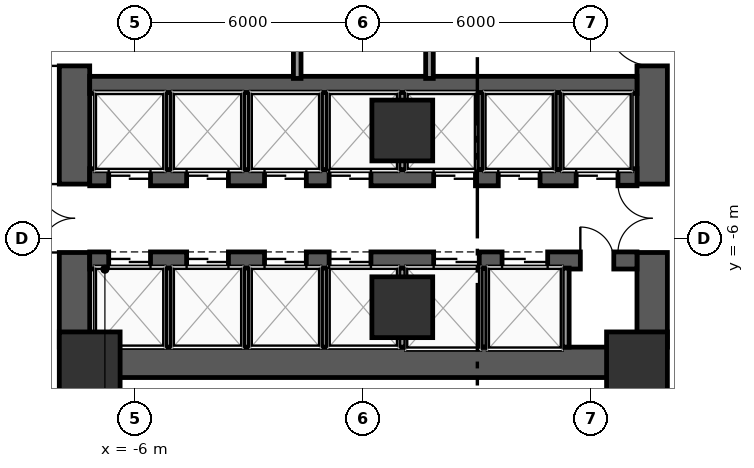
"""IFC4 building model, lengths in metres.
Left out: names, types, materials, properties, quantities, classifications, styles, units other than length and angle.
Written with IfcOpenShell. Run it as: python <this file> out.ifc"""

import sys

from ifc_helpers import new_model, si_unit, direction, frame, frame_2d, origin, origin_2d, place, context, subcontext, project, spatial, rectangle, extrude, element, fill, save


model = new_model("IFC4")
c1 = context("Model", 3, precision=1e-05, world=origin(), true_north=direction((0.0, 1.0)))
c2 = subcontext(c1, "Body", "Model", "MODEL_VIEW")
j1 = project(units=[si_unit("LENGTHUNIT", "METRE"), si_unit("PLANEANGLEUNIT", "RADIAN")], contexts=[c1])
p1 = place(None, origin())
s1 = spatial("IfcSite", under=j1, at=p1, CompositionType="ELEMENT")
p2 = place(p1, origin())
s2 = spatial("IfcBuilding", under=s1, at=p2, CompositionType="ELEMENT")
p3 = place(p2, origin())
s3 = spatial("IfcBuildingStorey", under=s2, at=p3, CompositionType="ELEMENT", Elevation=0.0)
p4 = place(p3, frame((-7.6, -8.85, 0.0), z_axis=(0.0, 0.0, 1.0), x_axis=(0.0, 1.0, 0.0)))
e1 = element("IfcWall", 1, at=p4, inside=s3, PredefinedType="SHEAR", context=c2, shape_type="SweptSolid", body=[
    extrude(rectangle(XDim=8.95, YDim=0.8, at=frame_2d((4.475, 0.0))), origin(), (0.0, 0.0, 1.0), 5.7),
])
p5 = place(p4, frame((2.49, 0.0, 0.0)))
e2 = element("IfcOpeningElement", 2, at=p5, cuts=e1, PredefinedType="OPENING", context=c2, shape_type="SweptSolid", body=[
    extrude(rectangle(XDim=1.8, YDim=2.2, at=frame_2d((0.9, 1.1))), frame((0.0, 0.41, 0.0), z_axis=(0.0, -1.0, 0.0), x_axis=(1.0, 0.0, 0.0)), (0.0, 0.0, 1.0), 0.82),
])
p6 = place(p4, frame((7.4, 0.0, 0.0)))
e3 = element("IfcOpeningElement", 3, at=p6, cuts=e1, PredefinedType="OPENING", context=c2, shape_type="SweptSolid", body=[
    extrude(rectangle(XDim=1.2, YDim=2.15, at=frame_2d((0.6, 1.075))), frame((0.0, 0.41, 0.0), z_axis=(0.0, -1.0, 0.0), x_axis=(1.0, 0.0, 0.0)), (0.0, 0.0, 1.0), 0.82),
])
p7 = place(p3, frame((7.6, -8.85, 0.0), z_axis=(0.0, 0.0, 1.0), x_axis=(0.0, 1.0, 0.0)))
e4 = element("IfcWall", 4, at=p7, inside=s3, PredefinedType="SHEAR", context=c2, shape_type="SweptSolid", body=[
    extrude(rectangle(XDim=8.95, YDim=0.8, at=frame_2d((4.475, 0.0))), origin(), (0.0, 0.0, 1.0), 5.7),
])
p8 = place(p7, frame((2.49, 0.0, 0.0)))
e5 = element("IfcOpeningElement", 5, at=p8, cuts=e4, PredefinedType="OPENING", context=c2, shape_type="SweptSolid", body=[
    extrude(rectangle(XDim=1.8, YDim=2.2, at=frame_2d((0.9, 1.1))), frame((0.0, 0.41, 0.0), z_axis=(0.0, -1.0, 0.0), x_axis=(1.0, 0.0, 0.0)), (0.0, 0.0, 1.0), 0.82),
])
p9 = place(p7, frame((7.4, 0.0, 0.0)))
e6 = element("IfcOpeningElement", 6, at=p9, cuts=e4, PredefinedType="OPENING", context=c2, shape_type="SweptSolid", body=[
    extrude(rectangle(XDim=1.2, YDim=2.15, at=frame_2d((0.6, 1.075))), frame((0.0, 0.41, 0.0), z_axis=(0.0, -1.0, 0.0), x_axis=(1.0, 0.0, 0.0)), (0.0, 0.0, 1.0), 0.82),
])
p10 = place(p3, frame((-7.6, -9.25, 0.0), z_axis=(0.0, 0.0, 1.0), x_axis=(1.0, 0.0, 0.0)))
e7 = element("IfcWall", 7, at=p10, inside=s3, PredefinedType="SHEAR", context=c2, shape_type="SweptSolid", body=[
    extrude(rectangle(XDim=15.2, YDim=0.8, at=frame_2d((7.6, 0.0))), origin(), (0.0, 0.0, 1.0), 5.7),
])
p11 = place(p3, frame((-7.2, -1.95, 0.0), z_axis=(0.0, 0.0, 1.0), x_axis=(1.0, 0.0, 0.0)))
e8 = element("IfcWall", 8, at=p11, inside=s3, PredefinedType="SHEAR", context=c2, shape_type="SweptSolid", body=[
    extrude(rectangle(XDim=14.4, YDim=0.45, at=frame_2d((7.2, 0.0))), origin(), (0.0, 0.0, 1.0), 5.7),
])
p12 = place(p3, frame((-7.2, -4.38, 0.0), z_axis=(0.0, 0.0, 1.0), x_axis=(1.0, 0.0, 0.0)))
e9 = element("IfcWall", 9, at=p12, inside=s3, PredefinedType="SHEAR", context=c2, shape_type="SweptSolid", body=[
    extrude(rectangle(XDim=14.4, YDim=0.45, at=frame_2d((7.2, 0.0))), origin(), (0.0, 0.0, 1.0), 5.7),
])
p13 = place(p12, frame((0.5, 0.0, 0.0)))
e10 = element("IfcOpeningElement", 10, at=p13, cuts=e9, PredefinedType="OPENING", context=c2, shape_type="SweptSolid", body=[
    extrude(rectangle(XDim=1.1, YDim=2.2, at=frame_2d((0.55, 1.1))), frame((0.0, 0.235, 0.0), z_axis=(0.0, -1.0, 0.0), x_axis=(1.0, 0.0, 0.0)), (0.0, 0.0, 1.0), 0.47),
])
p14 = place(p12, frame((2.55, 0.0, 0.0)))
e11 = element("IfcOpeningElement", 11, at=p14, cuts=e9, PredefinedType="OPENING", context=c2, shape_type="SweptSolid", body=[
    extrude(rectangle(XDim=1.1, YDim=2.2, at=frame_2d((0.55, 1.1))), frame((0.0, 0.235, 0.0), z_axis=(0.0, -1.0, 0.0), x_axis=(1.0, 0.0, 0.0)), (0.0, 0.0, 1.0), 0.47),
])
p15 = place(p12, frame((4.6, 0.0, 0.0)))
e12 = element("IfcOpeningElement", 12, at=p15, cuts=e9, PredefinedType="OPENING", context=c2, shape_type="SweptSolid", body=[
    extrude(rectangle(XDim=1.1, YDim=2.2, at=frame_2d((0.55, 1.1))), frame((0.0, 0.235, 0.0), z_axis=(0.0, -1.0, 0.0), x_axis=(1.0, 0.0, 0.0)), (0.0, 0.0, 1.0), 0.47),
])
p16 = place(p12, frame((6.3, 0.0, 0.0)))
e13 = element("IfcOpeningElement", 13, at=p16, cuts=e9, PredefinedType="OPENING", context=c2, shape_type="SweptSolid", body=[
    extrude(rectangle(XDim=1.1, YDim=2.2, at=frame_2d((0.55, 1.1))), frame((0.0, 0.235, 0.0), z_axis=(0.0, -1.0, 0.0), x_axis=(1.0, 0.0, 0.0)), (0.0, 0.0, 1.0), 0.47),
])
p17 = place(p12, frame((9.05, 0.0, 0.0)))
e14 = element("IfcOpeningElement", 14, at=p17, cuts=e9, PredefinedType="OPENING", context=c2, shape_type="SweptSolid", body=[
    extrude(rectangle(XDim=1.1, YDim=2.2, at=frame_2d((0.55, 1.1))), frame((0.0, 0.235, 0.0), z_axis=(0.0, -1.0, 0.0), x_axis=(1.0, 0.0, 0.0)), (0.0, 0.0, 1.0), 0.47),
])
p18 = place(p12, frame((10.75, 0.0, 0.0)))
e15 = element("IfcOpeningElement", 15, at=p18, cuts=e9, PredefinedType="OPENING", context=c2, shape_type="SweptSolid", body=[
    extrude(rectangle(XDim=1.1, YDim=2.2, at=frame_2d((0.55, 1.1))), frame((0.0, 0.235, 0.0), z_axis=(0.0, -1.0, 0.0), x_axis=(1.0, 0.0, 0.0)), (0.0, 0.0, 1.0), 0.47),
])
p19 = place(p12, frame((12.8, 0.0, 0.0)))
e16 = element("IfcOpeningElement", 16, at=p19, cuts=e9, PredefinedType="OPENING", context=c2, shape_type="SweptSolid", body=[
    extrude(rectangle(XDim=1.1, YDim=2.2, at=frame_2d((0.55, 1.1))), frame((0.0, 0.235, 0.0), z_axis=(0.0, -1.0, 0.0), x_axis=(1.0, 0.0, 0.0)), (0.0, 0.0, 1.0), 0.47),
])
p20 = place(p3, frame((-7.2, -6.57, 0.0), z_axis=(0.0, 0.0, 1.0), x_axis=(1.0, 0.0, 0.0)))
e17 = element("IfcWall", 17, at=p20, inside=s3, PredefinedType="SHEAR", context=c2, shape_type="SweptSolid", body=[
    extrude(rectangle(XDim=14.4, YDim=0.45, at=frame_2d((7.2, 0.0))), origin(), (0.0, 0.0, 1.0), 5.7),
])
p21 = place(p20, frame((0.5, 0.0, 0.0)))
e18 = element("IfcOpeningElement", 18, at=p21, cuts=e17, PredefinedType="OPENING", context=c2, shape_type="SweptSolid", body=[
    extrude(rectangle(XDim=1.1, YDim=2.2, at=frame_2d((0.55, 1.1))), frame((0.0, 0.235, 0.0), z_axis=(0.0, -1.0, 0.0), x_axis=(1.0, 0.0, 0.0)), (0.0, 0.0, 1.0), 0.47),
])
p22 = place(p20, frame((2.55, 0.0, 0.0)))
e19 = element("IfcOpeningElement", 19, at=p22, cuts=e17, PredefinedType="OPENING", context=c2, shape_type="SweptSolid", body=[
    extrude(rectangle(XDim=1.1, YDim=2.2, at=frame_2d((0.55, 1.1))), frame((0.0, 0.235, 0.0), z_axis=(0.0, -1.0, 0.0), x_axis=(1.0, 0.0, 0.0)), (0.0, 0.0, 1.0), 0.47),
])
p23 = place(p20, frame((4.6, 0.0, 0.0)))
e20 = element("IfcOpeningElement", 20, at=p23, cuts=e17, PredefinedType="OPENING", context=c2, shape_type="SweptSolid", body=[
    extrude(rectangle(XDim=1.1, YDim=2.2, at=frame_2d((0.55, 1.1))), frame((0.0, 0.235, 0.0), z_axis=(0.0, -1.0, 0.0), x_axis=(1.0, 0.0, 0.0)), (0.0, 0.0, 1.0), 0.47),
])
p24 = place(p20, frame((6.3, 0.0, 0.0)))
e21 = element("IfcOpeningElement", 21, at=p24, cuts=e17, PredefinedType="OPENING", context=c2, shape_type="SweptSolid", body=[
    extrude(rectangle(XDim=1.1, YDim=2.2, at=frame_2d((0.55, 1.1))), frame((0.0, 0.235, 0.0), z_axis=(0.0, -1.0, 0.0), x_axis=(1.0, 0.0, 0.0)), (0.0, 0.0, 1.0), 0.47),
])
p25 = place(p20, frame((9.05, 0.0, 0.0)))
e22 = element("IfcOpeningElement", 22, at=p25, cuts=e17, PredefinedType="OPENING", context=c2, shape_type="SweptSolid", body=[
    extrude(rectangle(XDim=1.2, YDim=2.25, at=frame_2d((0.6, 1.125))), frame((0.0, 0.235, 0.0), z_axis=(0.0, -1.0, 0.0), x_axis=(1.0, 0.0, 0.0)), (0.0, 0.0, 1.0), 0.47),
])
p26 = place(p20, frame((10.85, 0.0, 0.0)))
e23 = element("IfcOpeningElement", 23, at=p26, cuts=e17, PredefinedType="OPENING", context=c2, shape_type="SweptSolid", body=[
    extrude(rectangle(XDim=1.2, YDim=2.25, at=frame_2d((0.6, 1.125))), frame((0.0, 0.235, 0.0), z_axis=(0.0, -1.0, 0.0), x_axis=(1.0, 0.0, 0.0)), (0.0, 0.0, 1.0), 0.47),
])
p27 = place(p20, frame((12.91, 0.0, 0.0)))
e24 = element("IfcOpeningElement", 24, at=p27, cuts=e17, PredefinedType="OPENING", context=c2, shape_type="SweptSolid", body=[
    extrude(rectangle(XDim=0.88, YDim=2.15, at=frame_2d((0.44, 1.075))), frame((0.0, 0.235, 0.0), z_axis=(0.0, -1.0, 0.0), x_axis=(1.0, 0.0, 0.0)), (0.0, 0.0, 1.0), 0.47),
])
for number, where, z_axis, x_axis in (
    (25, (-7.2, -9.25, 0.0), (0.0, 0.0, 1.0), (1.0, 0.0, 0.0)),
    (26, (7.2, -9.25, 0.0), (0.0, 0.0, 1.0), (1.0, 0.0, 0.0)),
    (27, (1.025, -3.15, 0.0), (0.0, 0.0, 1.0), (1.0, 0.0, 0.0)),
    (28, (1.025, -7.8, 0.0), (0.0, 0.0, 1.0), (1.0, 0.0, 0.0)),
):
    element("IfcColumn", number, at=place(p3, frame(where, z_axis=z_axis, x_axis=x_axis)), inside=s3, PredefinedType="COLUMN", context=c2, shape_type="SweptSolid", body=[
        extrude(rectangle(XDim=1.6, YDim=1.6, at=origin_2d()), origin(), (0.0, 0.0, 1.0), 6.0),
    ])
for number, where, z_axis, x_axis in (
    (29, (-5.125, -4.18, 0.0), (0.0, 0.0, 1.0), (0.0, 1.0, 0.0)),
    (30, (-3.075, -4.18, 0.0), (0.0, 0.0, 1.0), (0.0, 1.0, 0.0)),
    (31, (-1.025, -4.18, 0.0), (0.0, 0.0, 1.0), (0.0, 1.0, 0.0)),
):
    element("IfcWall", number, at=place(p3, frame(where, z_axis=z_axis, x_axis=x_axis)), inside=s3, PredefinedType="PARTITIONING", context=c2, shape_type="SweptSolid", body=[
        extrude(rectangle(XDim=2.03, YDim=0.15, at=frame_2d((1.015, 0.0))), origin(), (0.0, 0.0, 1.0), 5.7),
    ])
p28 = place(p3, frame((1.025, -4.18, 0.0), z_axis=(0.0, 0.0, 1.0), x_axis=(0.0, 1.0, 0.0)))
e32 = element("IfcWall", 32, at=p28, inside=s3, PredefinedType="PARTITIONING", context=c2, shape_type="SweptSolid", body=[
    extrude(rectangle(XDim=2.03, YDim=0.18, at=frame_2d((1.015, 0.0))), origin(), (0.0, 0.0, 1.0), 4.748),
])
for number, where, z_axis, x_axis in (
    (33, (3.075, -4.18, 0.0), (0.0, 0.0, 1.0), (0.0, 1.0, 0.0)),
    (34, (5.125, -4.18, 0.0), (0.0, 0.0, 1.0), (0.0, 1.0, 0.0)),
):
    element("IfcWall", number, at=place(p3, frame(where, z_axis=z_axis, x_axis=x_axis)), inside=s3, PredefinedType="PARTITIONING", context=c2, shape_type="SweptSolid", body=[
        extrude(rectangle(XDim=2.03, YDim=0.15, at=frame_2d((1.015, 0.0))), origin(), (0.0, 0.0, 1.0), 5.7),
    ])
for number, where, z_axis, x_axis in (
    (35, (-5.125, -8.85, 0.0), (0.0, 0.0, 1.0), (0.0, 1.0, 0.0)),
    (36, (-3.075, -8.85, 0.0), (0.0, 0.0, 1.0), (0.0, 1.0, 0.0)),
    (37, (-1.025, -8.85, 0.0), (0.0, 0.0, 1.0), (0.0, 1.0, 0.0)),
):
    element("IfcWall", number, at=place(p3, frame(where, z_axis=z_axis, x_axis=x_axis)), inside=s3, PredefinedType="PARTITIONING", context=c2, shape_type="SweptSolid", body=[
        extrude(rectangle(XDim=2.08, YDim=0.15, at=frame_2d((1.04, 0.0))), origin(), (0.0, 0.0, 1.0), 5.7),
    ])
p29 = place(p3, frame((1.025, -8.85, 0.0), z_axis=(0.0, 0.0, 1.0), x_axis=(0.0, 1.0, 0.0)))
e38 = element("IfcWall", 38, at=p29, inside=s3, PredefinedType="PARTITIONING", context=c2, shape_type="SweptSolid", body=[
    extrude(rectangle(XDim=2.08, YDim=0.18, at=frame_2d((1.04, 0.0))), origin(), (0.0, 0.0, 1.0), 4.748),
])
p30 = place(p3, frame((3.175, -8.85, 0.0), z_axis=(0.0, 0.0, 1.0), x_axis=(0.0, 1.0, 0.0)))
e39 = element("IfcWall", 39, at=p30, inside=s3, PredefinedType="PARTITIONING", context=c2, shape_type="SweptSolid", body=[
    extrude(rectangle(XDim=2.08, YDim=0.15, at=frame_2d((1.04, 0.0))), origin(), (0.0, 0.0, 1.0), 5.7),
])
p31 = place(p3, frame((5.325, -8.85, 0.0), z_axis=(0.0, 0.0, 1.0), x_axis=(0.0, 1.0, 0.0)))
e40 = element("IfcWall", 40, at=p31, inside=s3, PredefinedType="PARTITIONING", context=c2, shape_type="SweptSolid", body=[
    extrude(rectangle(XDim=2.08, YDim=0.18, at=frame_2d((1.04, 0.0))), origin(), (0.0, 0.0, 1.0), 5.7),
])
p32 = place(p3, frame((-1.74, -1.78, 0.0), z_axis=(0.0, 0.0, 1.0), x_axis=(0.0, 1.0, 0.0)))
e41 = element("IfcWall", 41, at=p32, inside=s3, PredefinedType="PARTITIONING", context=c2, shape_type="SweptSolid", body=[
    extrude(rectangle(XDim=2.98, YDim=0.2, at=frame_2d((1.49, 0.0))), origin(), (0.0, 0.0, 1.0), 5.7),
])
p33 = place(p32, frame((0.89, 0.0, 0.0)))
e42 = element("IfcOpeningElement", 42, at=p33, cuts=e41, PredefinedType="OPENING", context=c2, shape_type="SweptSolid", body=[
    extrude(rectangle(XDim=0.88, YDim=2.15, at=frame_2d((0.44, 1.075))), frame((0.0, 0.11, 0.0), z_axis=(0.0, -1.0, 0.0), x_axis=(1.0, 0.0, 0.0)), (0.0, 0.0, 1.0), 0.22),
])
p34 = place(p3, frame((1.74, -1.78, 0.0), z_axis=(0.0, 0.0, 1.0), x_axis=(0.0, 1.0, 0.0)))
e43 = element("IfcWall", 43, at=p34, inside=s3, PredefinedType="PARTITIONING", context=c2, shape_type="SweptSolid", body=[
    extrude(rectangle(XDim=2.98, YDim=0.2, at=frame_2d((1.49, 0.0))), origin(), (0.0, 0.0, 1.0), 5.7),
])
p35 = place(p13, origin())
e44 = element("IfcDoor", 44, at=p35, inside=s3, OperationType="DOUBLE_DOOR_SLIDING", PredefinedType="DOOR", context=c2, shape_type="SweptSolid", body=[
    extrude(rectangle(XDim=1.1, YDim=2.2, at=frame_2d((0.55, 1.1))), frame((0.0, 0.025, 0.0), z_axis=(0.0, -1.0, 0.0), x_axis=(1.0, 0.0, 0.0)), (0.0, 0.0, 1.0), 0.05),
])
fill(e10, e44)
p36 = place(p14, origin())
e45 = element("IfcDoor", 45, at=p36, inside=s3, OperationType="DOUBLE_DOOR_SLIDING", PredefinedType="DOOR", context=c2, shape_type="SweptSolid", body=[
    extrude(rectangle(XDim=1.1, YDim=2.2, at=frame_2d((0.55, 1.1))), frame((0.0, 0.025, 0.0), z_axis=(0.0, -1.0, 0.0), x_axis=(1.0, 0.0, 0.0)), (0.0, 0.0, 1.0), 0.05),
])
fill(e11, e45)
p37 = place(p15, origin())
e46 = element("IfcDoor", 46, at=p37, inside=s3, OperationType="DOUBLE_DOOR_SLIDING", PredefinedType="DOOR", context=c2, shape_type="SweptSolid", body=[
    extrude(rectangle(XDim=1.1, YDim=2.2, at=frame_2d((0.55, 1.1))), frame((0.0, 0.025, 0.0), z_axis=(0.0, -1.0, 0.0), x_axis=(1.0, 0.0, 0.0)), (0.0, 0.0, 1.0), 0.05),
])
fill(e12, e46)
p38 = place(p16, origin())
e47 = element("IfcDoor", 47, at=p38, inside=s3, OperationType="DOUBLE_DOOR_SLIDING", PredefinedType="DOOR", context=c2, shape_type="SweptSolid", body=[
    extrude(rectangle(XDim=1.1, YDim=2.2, at=frame_2d((0.55, 1.1))), frame((0.0, 0.025, 0.0), z_axis=(0.0, -1.0, 0.0), x_axis=(1.0, 0.0, 0.0)), (0.0, 0.0, 1.0), 0.05),
])
fill(e13, e47)
p39 = place(p17, origin())
e48 = element("IfcDoor", 48, at=p39, inside=s3, OperationType="DOUBLE_DOOR_SLIDING", PredefinedType="DOOR", context=c2, shape_type="SweptSolid", body=[
    extrude(rectangle(XDim=1.1, YDim=2.2, at=frame_2d((0.55, 1.1))), frame((0.0, 0.025, 0.0), z_axis=(0.0, -1.0, 0.0), x_axis=(1.0, 0.0, 0.0)), (0.0, 0.0, 1.0), 0.05),
])
fill(e14, e48)
p40 = place(p18, origin())
e49 = element("IfcDoor", 49, at=p40, inside=s3, OperationType="DOUBLE_DOOR_SLIDING", PredefinedType="DOOR", context=c2, shape_type="SweptSolid", body=[
    extrude(rectangle(XDim=1.1, YDim=2.2, at=frame_2d((0.55, 1.1))), frame((0.0, 0.025, 0.0), z_axis=(0.0, -1.0, 0.0), x_axis=(1.0, 0.0, 0.0)), (0.0, 0.0, 1.0), 0.05),
])
fill(e15, e49)
p41 = place(p19, origin())
e50 = element("IfcDoor", 50, at=p41, inside=s3, OperationType="DOUBLE_DOOR_SLIDING", PredefinedType="DOOR", context=c2, shape_type="SweptSolid", body=[
    extrude(rectangle(XDim=1.1, YDim=2.2, at=frame_2d((0.55, 1.1))), frame((0.0, 0.025, 0.0), z_axis=(0.0, -1.0, 0.0), x_axis=(1.0, 0.0, 0.0)), (0.0, 0.0, 1.0), 0.05),
])
fill(e16, e50)
p42 = place(p21, origin())
e51 = element("IfcDoor", 51, at=p42, inside=s3, OperationType="DOUBLE_DOOR_SLIDING", PredefinedType="DOOR", context=c2, shape_type="SweptSolid", body=[
    extrude(rectangle(XDim=1.1, YDim=2.2, at=frame_2d((0.55, 1.1))), frame((0.0, 0.025, 0.0), z_axis=(0.0, -1.0, 0.0), x_axis=(1.0, 0.0, 0.0)), (0.0, 0.0, 1.0), 0.05),
])
fill(e18, e51)
p43 = place(p22, origin())
e52 = element("IfcDoor", 52, at=p43, inside=s3, OperationType="DOUBLE_DOOR_SLIDING", PredefinedType="DOOR", context=c2, shape_type="SweptSolid", body=[
    extrude(rectangle(XDim=1.1, YDim=2.2, at=frame_2d((0.55, 1.1))), frame((0.0, 0.025, 0.0), z_axis=(0.0, -1.0, 0.0), x_axis=(1.0, 0.0, 0.0)), (0.0, 0.0, 1.0), 0.05),
])
fill(e19, e52)
p44 = place(p23, origin())
e53 = element("IfcDoor", 53, at=p44, inside=s3, OperationType="DOUBLE_DOOR_SLIDING", PredefinedType="DOOR", context=c2, shape_type="SweptSolid", body=[
    extrude(rectangle(XDim=1.1, YDim=2.2, at=frame_2d((0.55, 1.1))), frame((0.0, 0.025, 0.0), z_axis=(0.0, -1.0, 0.0), x_axis=(1.0, 0.0, 0.0)), (0.0, 0.0, 1.0), 0.05),
])
fill(e20, e53)
p45 = place(p24, origin())
e54 = element("IfcDoor", 54, at=p45, inside=s3, OperationType="DOUBLE_DOOR_SLIDING", PredefinedType="DOOR", context=c2, shape_type="SweptSolid", body=[
    extrude(rectangle(XDim=1.1, YDim=2.2, at=frame_2d((0.55, 1.1))), frame((0.0, 0.025, 0.0), z_axis=(0.0, -1.0, 0.0), x_axis=(1.0, 0.0, 0.0)), (0.0, 0.0, 1.0), 0.05),
])
fill(e21, e54)
p46 = place(p25, origin())
e55 = element("IfcDoor", 55, at=p46, inside=s3, OperationType="DOUBLE_DOOR_SLIDING", PredefinedType="DOOR", context=c2, shape_type="SweptSolid", body=[
    extrude(rectangle(XDim=1.2, YDim=2.25, at=frame_2d((0.6, 1.125))), frame((0.0, 0.025, 0.0), z_axis=(0.0, -1.0, 0.0), x_axis=(1.0, 0.0, 0.0)), (0.0, 0.0, 1.0), 0.05),
])
fill(e22, e55)
p47 = place(p26, origin())
e56 = element("IfcDoor", 56, at=p47, inside=s3, OperationType="DOUBLE_DOOR_SLIDING", PredefinedType="DOOR", context=c2, shape_type="SweptSolid", body=[
    extrude(rectangle(XDim=1.2, YDim=2.25, at=frame_2d((0.6, 1.125))), frame((0.0, 0.025, 0.0), z_axis=(0.0, -1.0, 0.0), x_axis=(1.0, 0.0, 0.0)), (0.0, 0.0, 1.0), 0.05),
])
fill(e23, e56)
p48 = place(p5, origin())
e57 = element("IfcDoor", 57, at=p48, inside=s3, OperationType="DOUBLE_DOOR_SINGLE_SWING", PredefinedType="DOOR", context=c2, shape_type="SweptSolid", body=[
    extrude(rectangle(XDim=1.8, YDim=2.2, at=frame_2d((0.9, 1.1))), frame((0.0, 0.025, 0.0), z_axis=(0.0, -1.0, 0.0), x_axis=(1.0, 0.0, 0.0)), (0.0, 0.0, 1.0), 0.05),
])
fill(e2, e57)
p49 = place(p6, origin())
e58 = element("IfcDoor", 58, at=p49, inside=s3, OperationType="SINGLE_SWING_LEFT", PredefinedType="DOOR", context=c2, shape_type="SweptSolid", body=[
    extrude(rectangle(XDim=1.2, YDim=2.15, at=frame_2d((0.6, 1.075))), frame((0.0, 0.025, 0.0), z_axis=(0.0, -1.0, 0.0), x_axis=(1.0, 0.0, 0.0)), (0.0, 0.0, 1.0), 0.05),
])
fill(e3, e58)
p50 = place(p8, origin())
e59 = element("IfcDoor", 59, at=p50, inside=s3, OperationType="DOUBLE_DOOR_SINGLE_SWING", PredefinedType="DOOR", context=c2, shape_type="SweptSolid", body=[
    extrude(rectangle(XDim=1.8, YDim=2.2, at=frame_2d((0.9, 1.1))), frame((0.0, 0.025, 0.0), z_axis=(0.0, -1.0, 0.0), x_axis=(1.0, 0.0, 0.0)), (0.0, 0.0, 1.0), 0.05),
])
fill(e5, e59)
p51 = place(p9, origin())
e60 = element("IfcDoor", 60, at=p51, inside=s3, OperationType="SINGLE_SWING_RIGHT", PredefinedType="DOOR", context=c2, shape_type="SweptSolid", body=[
    extrude(rectangle(XDim=1.2, YDim=2.15, at=frame_2d((0.6, 1.075))), frame((0.0, 0.025, 0.0), z_axis=(0.0, -1.0, 0.0), x_axis=(1.0, 0.0, 0.0)), (0.0, 0.0, 1.0), 0.05),
])
fill(e6, e60)
p52 = place(p27, origin())
e61 = element("IfcDoor", 61, at=p52, inside=s3, OperationType="SINGLE_SWING_LEFT", PredefinedType="DOOR", context=c2, shape_type="SweptSolid", body=[
    extrude(rectangle(XDim=0.88, YDim=2.15, at=frame_2d((0.44, 1.075))), frame((0.0, 0.025, 0.0), z_axis=(0.0, -1.0, 0.0), x_axis=(1.0, 0.0, 0.0)), (0.0, 0.0, 1.0), 0.05),
])
fill(e24, e61)
save(model, sys.argv[1])
